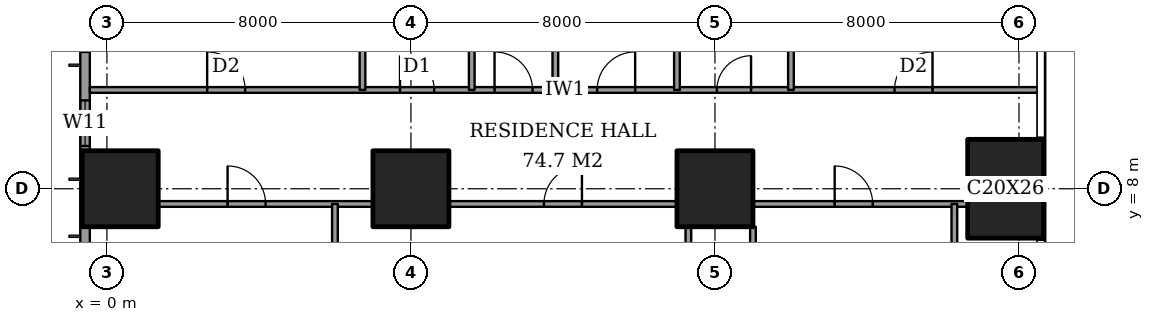
"""IFC4 building model, lengths in metres.
Left out: names, types, materials, properties, quantities, classifications, styles, units other than length and angle.
Written with IfcOpenShell. Run it as: python <this file> out.ifc"""

import sys

from ifc_helpers import new_model, si_unit, direction, frame, frame_2d, origin, origin_2d, place, context, subcontext, project, spatial, rectangle, extrude, element, fill, save


model = new_model("IFC4")
c1 = context("Model", 3, precision=1e-05, world=origin(), true_north=direction((0.0, 1.0)))
c2 = subcontext(c1, "Body", "Model", "MODEL_VIEW")
j1 = project(units=[si_unit("LENGTHUNIT", "METRE"), si_unit("PLANEANGLEUNIT", "RADIAN")], contexts=[c1])
p1 = place(None, origin())
s1 = spatial("IfcSite", under=j1, at=p1, CompositionType="ELEMENT")
p2 = place(p1, origin())
s2 = spatial("IfcBuilding", under=s1, at=p2, CompositionType="ELEMENT")
p3 = place(p2, frame((0.0, 0.0, 107.0)))
s3 = spatial("IfcBuildingStorey", under=s2, at=p3, CompositionType="ELEMENT", Elevation=107.0)
for number, where, z_axis, x_axis in (
    (1, (0.35, 8.0, 0.0), (0.0, 0.0, 1.0), (1.0, 0.0, 0.0)),
    (2, (8.0, 8.0, 0.0), (0.0, 0.0, 1.0), (1.0, 0.0, 0.0)),
    (3, (16.0, 8.0, 0.0), (0.0, 0.0, 1.0), (1.0, 0.0, 0.0)),
):
    element("IfcColumn", number, at=place(p3, frame(where, z_axis=z_axis, x_axis=x_axis)), inside=s3, PredefinedType="COLUMN", context=c2, shape_type="SweptSolid", body=[
        extrude(rectangle(XDim=2.0, YDim=2.0, at=origin_2d()), origin(), (0.0, 0.0, 1.0), 3.6),
    ])
p4 = place(p3, frame((23.65, 8.0, 0.0), z_axis=(0.0, 0.0, 1.0), x_axis=(1.0, 0.0, 0.0)))
e4 = element("IfcColumn", 4, at=p4, inside=s3, PredefinedType="COLUMN", context=c2, shape_type="SweptSolid", body=[
    extrude(rectangle(XDim=2.0, YDim=2.6, at=origin_2d()), origin(), (0.0, 0.0, 1.0), 3.6),
])
p5 = place(p3, frame((-0.575, 44.825, 0.0), z_axis=(0.0, 0.0, 1.0), x_axis=(0.0, -1.0, 0.0)))
e5 = element("IfcWall", 5, at=p5, inside=s3, PredefinedType="SOLIDWALL", context=c2, shape_type="SweptSolid", body=[
    extrude(rectangle(XDim=41.65, YDim=0.25, at=frame_2d((20.825, 0.0))), origin(), (0.0, 0.0, 1.0), 3.6),
])
p6 = place(p5, frame((0.775, 0.0, 0.4)))
e6 = element("IfcOpeningElement", 6, at=p6, cuts=e5, PredefinedType="OPENING", context=c2, shape_type="SweptSolid", body=[
    extrude(rectangle(XDim=2.4, YDim=2.2, at=frame_2d((1.2, 1.1))), frame((0.0, 0.135, 0.0), z_axis=(0.0, -1.0, 0.0), x_axis=(1.0, 0.0, 0.0)), (0.0, 0.0, 1.0), 0.27),
])
p7 = place(p5, frame((6.2, 0.0, 0.4)))
e7 = element("IfcOpeningElement", 7, at=p7, cuts=e5, PredefinedType="OPENING", context=c2, shape_type="SweptSolid", body=[
    extrude(rectangle(XDim=1.2, YDim=2.2, at=frame_2d((0.6, 1.1))), frame((0.0, 0.135, 0.0), z_axis=(0.0, -1.0, 0.0), x_axis=(1.0, 0.0, 0.0)), (0.0, 0.0, 1.0), 0.27),
])
p8 = place(p5, frame((8.525, 0.0, 0.4)))
e8 = element("IfcOpeningElement", 8, at=p8, cuts=e5, PredefinedType="OPENING", context=c2, shape_type="SweptSolid", body=[
    extrude(rectangle(XDim=2.4, YDim=2.2, at=frame_2d((1.2, 1.1))), frame((0.0, 0.135, 0.0), z_axis=(0.0, -1.0, 0.0), x_axis=(1.0, 0.0, 0.0)), (0.0, 0.0, 1.0), 0.27),
])
p9 = place(p5, frame((15.625, 0.0, 0.4)))
e9 = element("IfcOpeningElement", 9, at=p9, cuts=e5, PredefinedType="OPENING", context=c2, shape_type="SweptSolid", body=[
    extrude(rectangle(XDim=2.4, YDim=2.2, at=frame_2d((1.2, 1.1))), frame((0.0, 0.135, 0.0), z_axis=(0.0, -1.0, 0.0), x_axis=(1.0, 0.0, 0.0)), (0.0, 0.0, 1.0), 0.27),
])
p10 = place(p5, frame((23.625, 0.0, 0.4)))
e10 = element("IfcOpeningElement", 10, at=p10, cuts=e5, PredefinedType="OPENING", context=c2, shape_type="SweptSolid", body=[
    extrude(rectangle(XDim=2.4, YDim=2.2, at=frame_2d((1.2, 1.1))), frame((0.0, 0.135, 0.0), z_axis=(0.0, -1.0, 0.0), x_axis=(1.0, 0.0, 0.0)), (0.0, 0.0, 1.0), 0.27),
])
p11 = place(p5, frame((30.825, 0.0, 0.4)))
e11 = element("IfcOpeningElement", 11, at=p11, cuts=e5, PredefinedType="OPENING", context=c2, shape_type="SweptSolid", body=[
    extrude(rectangle(XDim=2.4, YDim=2.2, at=frame_2d((1.2, 1.1))), frame((0.0, 0.135, 0.0), z_axis=(0.0, -1.0, 0.0), x_axis=(1.0, 0.0, 0.0)), (0.0, 0.0, 1.0), 0.27),
])
p12 = place(p5, frame((34.5, 0.0, 0.4)))
e12 = element("IfcOpeningElement", 12, at=p12, cuts=e5, PredefinedType="OPENING", context=c2, shape_type="SweptSolid", body=[
    extrude(rectangle(XDim=1.2, YDim=2.2, at=frame_2d((0.6, 1.1))), frame((0.0, 0.135, 0.0), z_axis=(0.0, -1.0, 0.0), x_axis=(1.0, 0.0, 0.0)), (0.0, 0.0, 1.0), 0.27),
])
p13 = place(p5, frame((38.475, 0.0, 0.4)))
e13 = element("IfcOpeningElement", 13, at=p13, cuts=e5, PredefinedType="OPENING", context=c2, shape_type="SweptSolid", body=[
    extrude(rectangle(XDim=2.4, YDim=2.2, at=frame_2d((1.2, 1.1))), frame((0.0, 0.135, 0.0), z_axis=(0.0, -1.0, 0.0), x_axis=(1.0, 0.0, 0.0)), (0.0, 0.0, 1.0), 0.27),
])
p14 = place(p3, frame((1.35, 7.6, 0.0), z_axis=(0.0, 0.0, 1.0), x_axis=(1.0, 0.0, 0.0)))
e14 = element("IfcWall", 14, at=p14, inside=s3, PredefinedType="PARTITIONING", context=c2, shape_type="SweptSolid", body=[
    extrude(rectangle(XDim=5.65, YDim=0.15, at=frame_2d((2.825, 0.0))), origin(), (0.0, 0.0, 1.0), 3.35),
])
p15 = place(p14, frame((1.825, 0.0, 0.0)))
e15 = element("IfcOpeningElement", 15, at=p15, cuts=e14, PredefinedType="OPENING", context=c2, shape_type="SweptSolid", body=[
    extrude(rectangle(XDim=1.0, YDim=2.1, at=frame_2d((0.5, 1.05))), frame((0.0, 0.085, 0.0), z_axis=(0.0, -1.0, 0.0), x_axis=(1.0, 0.0, 0.0)), (0.0, 0.0, 1.0), 0.17),
])
p16 = place(p3, frame((9.0, 7.6, 0.0), z_axis=(0.0, 0.0, 1.0), x_axis=(1.0, 0.0, 0.0)))
e16 = element("IfcWall", 16, at=p16, inside=s3, PredefinedType="PARTITIONING", context=c2, shape_type="SweptSolid", body=[
    extrude(rectangle(XDim=6.0, YDim=0.15, at=frame_2d((3.0, 0.0))), origin(), (0.0, 0.0, 1.0), 3.35),
])
p17 = place(p16, frame((2.5, 0.0, 0.0)))
e17 = element("IfcOpeningElement", 17, at=p17, cuts=e16, PredefinedType="OPENING", context=c2, shape_type="SweptSolid", body=[
    extrude(rectangle(XDim=1.0, YDim=2.1, at=frame_2d((0.5, 1.05))), frame((0.0, 0.085, 0.0), z_axis=(0.0, -1.0, 0.0), x_axis=(1.0, 0.0, 0.0)), (0.0, 0.0, 1.0), 0.17),
])
p18 = place(p3, frame((17.0, 7.6, 0.0), z_axis=(0.0, 0.0, 1.0), x_axis=(1.0, 0.0, 0.0)))
e18 = element("IfcWall", 18, at=p18, inside=s3, PredefinedType="PARTITIONING", context=c2, shape_type="SweptSolid", body=[
    extrude(rectangle(XDim=5.65, YDim=0.15, at=frame_2d((2.825, 0.0))), origin(), (0.0, 0.0, 1.0), 3.35),
])
p19 = place(p18, frame((2.15, 0.0, 0.0)))
e19 = element("IfcOpeningElement", 19, at=p19, cuts=e18, PredefinedType="OPENING", context=c2, shape_type="SweptSolid", body=[
    extrude(rectangle(XDim=1.0, YDim=2.1, at=frame_2d((0.5, 1.05))), frame((0.0, 0.085, 0.0), z_axis=(0.0, -1.0, 0.0), x_axis=(1.0, 0.0, 0.0)), (0.0, 0.0, 1.0), 0.17),
])
p20 = place(p3, frame((-0.45, 10.6, 0.0), z_axis=(0.0, 0.0, 1.0), x_axis=(1.0, 0.0, 0.0)))
e20 = element("IfcWall", 20, at=p20, inside=s3, PredefinedType="PARTITIONING", context=c2, shape_type="SweptSolid", body=[
    extrude(rectangle(XDim=25.011, YDim=0.15, at=frame_2d((12.505, 0.0))), origin(), (0.0, 0.0, 1.0), 3.35),
])
p21 = place(p20, frame((10.65, 0.0, 0.0)))
e21 = element("IfcOpeningElement", 21, at=p21, cuts=e20, PredefinedType="OPENING", context=c2, shape_type="SweptSolid", body=[
    extrude(rectangle(XDim=1.0, YDim=2.1, at=frame_2d((0.5, 1.05))), frame((0.0, 0.085, 0.0), z_axis=(0.0, -1.0, 0.0), x_axis=(1.0, 0.0, 0.0)), (0.0, 0.0, 1.0), 0.17),
])
p22 = place(p20, frame((3.087, 0.0, 0.0)))
e22 = element("IfcOpeningElement", 22, at=p22, cuts=e20, PredefinedType="OPENING", context=c2, shape_type="SweptSolid", body=[
    extrude(rectangle(XDim=1.0, YDim=2.1, at=frame_2d((0.5, 1.05))), frame((0.0, 0.085, 0.0), z_axis=(0.0, -1.0, 0.0), x_axis=(1.0, 0.0, 0.0)), (0.0, 0.0, 1.0), 0.17),
])
p23 = place(p20, frame((8.163, 0.0, 0.0)))
e23 = element("IfcOpeningElement", 23, at=p23, cuts=e20, PredefinedType="OPENING", context=c2, shape_type="SweptSolid", body=[
    extrude(rectangle(XDim=0.9, YDim=2.1, at=frame_2d((0.45, 1.05))), frame((0.0, 0.085, 0.0), z_axis=(0.0, -1.0, 0.0), x_axis=(1.0, 0.0, 0.0)), (0.0, 0.0, 1.0), 0.17),
])
p24 = place(p20, frame((13.35, 0.0, 0.0)))
e24 = element("IfcOpeningElement", 24, at=p24, cuts=e20, PredefinedType="OPENING", context=c2, shape_type="SweptSolid", body=[
    extrude(rectangle(XDim=1.0, YDim=2.1, at=frame_2d((0.5, 1.05))), frame((0.0, 0.085, 0.0), z_axis=(0.0, -1.0, 0.0), x_axis=(1.0, 0.0, 0.0)), (0.0, 0.0, 1.0), 0.17),
])
p25 = place(p20, frame((16.5, 0.0, 0.0)))
e25 = element("IfcOpeningElement", 25, at=p25, cuts=e20, PredefinedType="OPENING", context=c2, shape_type="SweptSolid", body=[
    extrude(rectangle(XDim=0.9, YDim=2.1, at=frame_2d((0.45, 1.05))), frame((0.0, 0.085, 0.0), z_axis=(0.0, -1.0, 0.0), x_axis=(1.0, 0.0, 0.0)), (0.0, 0.0, 1.0), 0.17),
])
p26 = place(p20, frame((21.175, 0.0, 0.0)))
e26 = element("IfcOpeningElement", 26, at=p26, cuts=e20, PredefinedType="OPENING", context=c2, shape_type="SweptSolid", body=[
    extrude(rectangle(XDim=1.0, YDim=2.1, at=frame_2d((0.5, 1.05))), frame((0.0, 0.085, 0.0), z_axis=(0.0, -1.0, 0.0), x_axis=(1.0, 0.0, 0.0)), (0.0, 0.0, 1.0), 0.17),
])
p27 = place(p3, frame((6.0, -0.45, 0.0), z_axis=(0.0, 0.0, 1.0), x_axis=(0.0, 1.0, 0.0)))
e27 = element("IfcWall", 27, at=p27, inside=s3, PredefinedType="PARTITIONING", context=c2, shape_type="SweptSolid", body=[
    extrude(rectangle(XDim=8.05, YDim=0.15, at=frame_2d((4.025, 0.0))), origin(), (0.0, 0.0, 1.0), 3.35),
])
p28 = place(p3, frame((6.725, 10.6, 0.0), z_axis=(0.0, 0.0, 1.0), x_axis=(0.0, 1.0, 0.0)))
e28 = element("IfcWall", 28, at=p28, inside=s3, PredefinedType="PARTITIONING", context=c2, shape_type="SweptSolid", body=[
    extrude(rectangle(XDim=4.2, YDim=0.15, at=frame_2d((2.1, 0.0))), origin(), (0.0, 0.0, 1.0), 3.35),
])
p29 = place(p3, frame((9.6, 10.6, 0.0), z_axis=(0.0, 0.0, 1.0), x_axis=(0.0, 1.0, 0.0)))
e29 = element("IfcWall", 29, at=p29, inside=s3, PredefinedType="PARTITIONING", context=c2, shape_type="SweptSolid", body=[
    extrude(rectangle(XDim=11.0, YDim=0.15, at=frame_2d((5.5, 0.0))), origin(), (0.0, 0.0, 1.0), 3.35),
])
p30 = place(p29, frame((8.7, 0.0, 0.0)))
e30 = element("IfcOpeningElement", 30, at=p30, cuts=e29, PredefinedType="OPENING", context=c2, shape_type="SweptSolid", body=[
    extrude(rectangle(XDim=1.0, YDim=2.1, at=frame_2d((0.5, 1.05))), frame((0.0, 0.085, 0.0), z_axis=(0.0, -1.0, 0.0), x_axis=(1.0, 0.0, 0.0)), (0.0, 0.0, 1.0), 0.17),
])
p31 = place(p3, frame((11.8, 10.6, 0.0), z_axis=(0.0, 0.0, 1.0), x_axis=(0.0, 1.0, 0.0)))
e31 = element("IfcWall", 31, at=p31, inside=s3, PredefinedType="PARTITIONING", context=c2, shape_type="SweptSolid", body=[
    extrude(rectangle(XDim=7.4, YDim=0.15, at=frame_2d((3.7, 0.0))), origin(), (0.0, 0.0, 1.0), 3.35),
])
p32 = place(p3, frame((15.0, 10.6, 0.0), z_axis=(0.0, 0.0, 1.0), x_axis=(0.0, 1.0, 0.0)))
e32 = element("IfcWall", 32, at=p32, inside=s3, PredefinedType="PARTITIONING", context=c2, shape_type="SweptSolid", body=[
    extrude(rectangle(XDim=4.2, YDim=0.15, at=frame_2d((2.1, 0.0))), origin(), (0.0, 0.0, 1.0), 3.35),
])
p33 = place(p3, frame((15.3, 1.35, 0.0), z_axis=(0.0, 0.0, 1.0), x_axis=(0.0, 1.0, 0.0)))
e33 = element("IfcWall", 33, at=p33, inside=s3, PredefinedType="PARTITIONING", context=c2, shape_type="SweptSolid", body=[
    extrude(rectangle(XDim=5.65, YDim=0.15, at=frame_2d((2.825, 0.0))), origin(), (0.0, 0.0, 1.0), 3.35),
])
p34 = place(p33, frame((2.375, 0.0, 0.0)))
e34 = element("IfcOpeningElement", 34, at=p34, cuts=e33, PredefinedType="OPENING", context=c2, shape_type="SweptSolid", body=[
    extrude(rectangle(XDim=0.9, YDim=2.1, at=frame_2d((0.45, 1.05))), frame((0.0, 0.085, 0.0), z_axis=(0.0, -1.0, 0.0), x_axis=(1.0, 0.0, 0.0)), (0.0, 0.0, 1.0), 0.17),
])
p35 = place(p3, frame((17.0, 1.35, 0.0), z_axis=(0.0, 0.0, 1.0), x_axis=(0.0, 1.0, 0.0)))
e35 = element("IfcWall", 35, at=p35, inside=s3, PredefinedType="PARTITIONING", context=c2, shape_type="SweptSolid", body=[
    extrude(rectangle(XDim=5.65, YDim=0.15, at=frame_2d((2.825, 0.0))), origin(), (0.0, 0.0, 1.0), 3.35),
])
p36 = place(p3, frame((18.0, 10.6, 0.0), z_axis=(0.0, 0.0, 1.0), x_axis=(0.0, 1.0, 0.0)))
e36 = element("IfcWall", 36, at=p36, inside=s3, PredefinedType="PARTITIONING", context=c2, shape_type="SweptSolid", body=[
    extrude(rectangle(XDim=7.4, YDim=0.15, at=frame_2d((3.7, 0.0))), origin(), (0.0, 0.0, 1.0), 3.35),
])
p37 = place(p3, frame((22.3, -0.45, 0.0), z_axis=(0.0, 0.0, 1.0), x_axis=(0.0, 1.0, 0.0)))
e37 = element("IfcWall", 37, at=p37, inside=s3, PredefinedType="PARTITIONING", context=c2, shape_type="SweptSolid", body=[
    extrude(rectangle(XDim=8.05, YDim=0.15, at=frame_2d((4.025, 0.0))), origin(), (0.0, 0.0, 1.0), 3.35),
])
p38 = place(p37, frame((3.575, 0.0, 0.0)))
e38 = element("IfcOpeningElement", 38, at=p38, cuts=e37, PredefinedType="OPENING", context=c2, shape_type="SweptSolid", body=[
    extrude(rectangle(XDim=0.9, YDim=2.1, at=frame_2d((0.45, 1.05))), frame((0.0, 0.085, 0.0), z_axis=(0.0, -1.0, 0.0), x_axis=(1.0, 0.0, 0.0)), (0.0, 0.0, 1.0), 0.17),
])
p39 = place(p12, origin())
e39 = element("IfcWindow", 39, at=p39, inside=s3, PartitioningType="SINGLE_PANEL", PredefinedType="WINDOW", context=c2, shape_type="SweptSolid", body=[
    extrude(rectangle(XDim=1.2, YDim=2.2, at=frame_2d((0.6, 1.1))), frame((0.0, 0.03, 0.0), z_axis=(0.0, -1.0, 0.0), x_axis=(1.0, 0.0, 0.0)), (0.0, 0.0, 1.0), 0.06),
])
fill(e12, e39)
p40 = place(p15, origin())
e40 = element("IfcDoor", 40, at=p40, inside=s3, OperationType="SINGLE_SWING_RIGHT", PredefinedType="DOOR", context=c2, shape_type="SweptSolid", body=[
    extrude(rectangle(XDim=1.0, YDim=2.1, at=frame_2d((0.5, 1.05))), frame((0.0, 0.025, 0.0), z_axis=(0.0, -1.0, 0.0), x_axis=(1.0, 0.0, 0.0)), (0.0, 0.0, 1.0), 0.05),
])
fill(e15, e40)
p41 = place(p17, origin())
e41 = element("IfcDoor", 41, at=p41, inside=s3, OperationType="SINGLE_SWING_LEFT", PredefinedType="DOOR", context=c2, shape_type="SweptSolid", body=[
    extrude(rectangle(XDim=1.0, YDim=2.1, at=frame_2d((0.5, 1.05))), frame((0.0, 0.025, 0.0), z_axis=(0.0, -1.0, 0.0), x_axis=(1.0, 0.0, 0.0)), (0.0, 0.0, 1.0), 0.05),
])
fill(e17, e41)
p42 = place(p19, origin())
e42 = element("IfcDoor", 42, at=p42, inside=s3, OperationType="SINGLE_SWING_RIGHT", PredefinedType="DOOR", context=c2, shape_type="SweptSolid", body=[
    extrude(rectangle(XDim=1.0, YDim=2.1, at=frame_2d((0.5, 1.05))), frame((0.0, 0.025, 0.0), z_axis=(0.0, -1.0, 0.0), x_axis=(1.0, 0.0, 0.0)), (0.0, 0.0, 1.0), 0.05),
])
fill(e19, e42)
p43 = place(p21, origin())
e43 = element("IfcDoor", 43, at=p43, inside=s3, OperationType="SINGLE_SWING_RIGHT", PredefinedType="DOOR", context=c2, shape_type="SweptSolid", body=[
    extrude(rectangle(XDim=1.0, YDim=2.1, at=frame_2d((0.5, 1.05))), frame((0.0, 0.025, 0.0), z_axis=(0.0, -1.0, 0.0), x_axis=(1.0, 0.0, 0.0)), (0.0, 0.0, 1.0), 0.05),
])
fill(e21, e43)
p44 = place(p22, origin())
e44 = element("IfcDoor", 44, at=p44, inside=s3, OperationType="SINGLE_SWING_RIGHT", PredefinedType="DOOR", context=c2, shape_type="SweptSolid", body=[
    extrude(rectangle(XDim=1.0, YDim=2.1, at=frame_2d((0.5, 1.05))), frame((0.0, 0.025, 0.0), z_axis=(0.0, -1.0, 0.0), x_axis=(1.0, 0.0, 0.0)), (0.0, 0.0, 1.0), 0.05),
])
fill(e22, e44)
p45 = place(p23, origin())
e45 = element("IfcDoor", 45, at=p45, inside=s3, OperationType="SINGLE_SWING_RIGHT", PredefinedType="DOOR", context=c2, shape_type="SweptSolid", body=[
    extrude(rectangle(XDim=0.9, YDim=2.1, at=frame_2d((0.45, 1.05))), frame((0.0, 0.025, 0.0), z_axis=(0.0, -1.0, 0.0), x_axis=(1.0, 0.0, 0.0)), (0.0, 0.0, 1.0), 0.05),
])
fill(e23, e45)
p46 = place(p24, origin())
e46 = element("IfcDoor", 46, at=p46, inside=s3, OperationType="SINGLE_SWING_LEFT", PredefinedType="DOOR", context=c2, shape_type="SweptSolid", body=[
    extrude(rectangle(XDim=1.0, YDim=2.1, at=frame_2d((0.5, 1.05))), frame((0.0, 0.025, 0.0), z_axis=(0.0, -1.0, 0.0), x_axis=(1.0, 0.0, 0.0)), (0.0, 0.0, 1.0), 0.05),
])
fill(e24, e46)
p47 = place(p25, origin())
e47 = element("IfcDoor", 47, at=p47, inside=s3, OperationType="SINGLE_SWING_LEFT", PredefinedType="DOOR", context=c2, shape_type="SweptSolid", body=[
    extrude(rectangle(XDim=0.9, YDim=2.1, at=frame_2d((0.45, 1.05))), frame((0.0, 0.025, 0.0), z_axis=(0.0, -1.0, 0.0), x_axis=(1.0, 0.0, 0.0)), (0.0, 0.0, 1.0), 0.05),
])
fill(e25, e47)
p48 = place(p26, origin())
e48 = element("IfcDoor", 48, at=p48, inside=s3, OperationType="SINGLE_SWING_LEFT", PredefinedType="DOOR", context=c2, shape_type="SweptSolid", body=[
    extrude(rectangle(XDim=1.0, YDim=2.1, at=frame_2d((0.5, 1.05))), frame((0.0, 0.025, 0.0), z_axis=(0.0, -1.0, 0.0), x_axis=(1.0, 0.0, 0.0)), (0.0, 0.0, 1.0), 0.05),
])
fill(e26, e48)
save(model, sys.argv[1])
